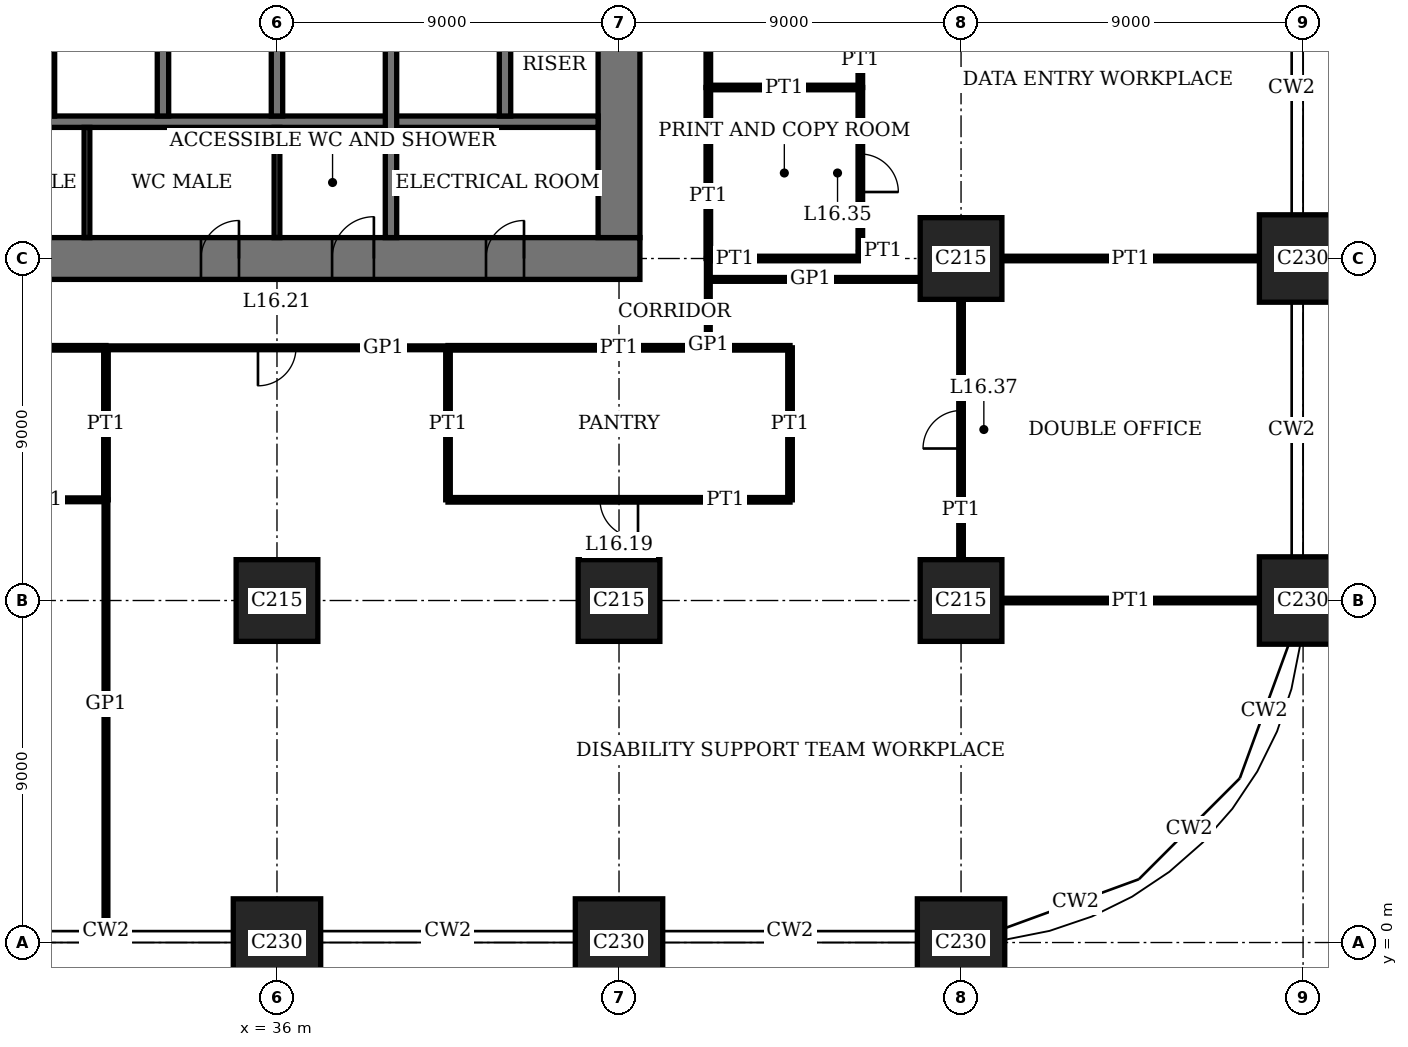
"""IFC4 building model, lengths in metres.
Left out: names, types, materials, properties, quantities, classifications, styles, units other than length and angle.
Written with IfcOpenShell. Run it as: python <this file> out.ifc"""

import sys

from ifc_helpers import new_model, si_unit, direction, frame, frame_2d, origin, origin_2d, place, context, subcontext, project, spatial, rectangle, extrude, element, fill, save


model = new_model("IFC4")
c1 = context("Model", 3, precision=1e-05, world=origin(), true_north=direction((0.0, 1.0)))
c2 = subcontext(c1, "Body", "Model", "MODEL_VIEW")
j1 = project(units=[si_unit("LENGTHUNIT", "METRE"), si_unit("PLANEANGLEUNIT", "RADIAN")], contexts=[c1])
p1 = place(None, origin())
s1 = spatial("IfcSite", under=j1, at=p1, CompositionType="ELEMENT")
p2 = place(p1, origin())
s2 = spatial("IfcBuilding", under=s1, at=p2, CompositionType="ELEMENT")
p3 = place(p2, frame((0.0, 0.0, 67.8)))
s3 = spatial("IfcBuildingStorey", under=s2, at=p3, CompositionType="ELEMENT", Elevation=67.8)
p4 = place(p3, frame((36.0, 0.0, 0.0), z_axis=(0.0, 0.0, 1.0), x_axis=(1.0, 0.0, 0.0)))
e1 = element("IfcColumn", 1, at=p4, inside=s3, PredefinedType="COLUMN", context=c2, shape_type="SweptSolid", body=[
    extrude(rectangle(XDim=2.3, YDim=2.3, at=origin_2d()), origin(), (0.0, 0.0, 1.0), 4.0),
])
p5 = place(p3, frame((36.0, 9.0, 0.0), z_axis=(0.0, 0.0, 1.0), x_axis=(1.0, 0.0, 0.0)))
e2 = element("IfcColumn", 2, at=p5, inside=s3, PredefinedType="COLUMN", context=c2, shape_type="SweptSolid", body=[
    extrude(rectangle(XDim=2.15, YDim=2.15, at=origin_2d()), origin(), (0.0, 0.0, 1.0), 4.0),
])
p6 = place(p3, frame((45.0, 0.0, 0.0), z_axis=(0.0, 0.0, 1.0), x_axis=(1.0, 0.0, 0.0)))
e3 = element("IfcColumn", 3, at=p6, inside=s3, PredefinedType="COLUMN", context=c2, shape_type="SweptSolid", body=[
    extrude(rectangle(XDim=2.3, YDim=2.3, at=origin_2d()), origin(), (0.0, 0.0, 1.0), 4.0),
])
p7 = place(p3, frame((45.0, 9.0, 0.0), z_axis=(0.0, 0.0, 1.0), x_axis=(1.0, 0.0, 0.0)))
e4 = element("IfcColumn", 4, at=p7, inside=s3, PredefinedType="COLUMN", context=c2, shape_type="SweptSolid", body=[
    extrude(rectangle(XDim=2.15, YDim=2.15, at=origin_2d()), origin(), (0.0, 0.0, 1.0), 4.0),
])
p8 = place(p3, frame((54.0, 0.0, 0.0), z_axis=(0.0, 0.0, 1.0), x_axis=(1.0, 0.0, 0.0)))
e5 = element("IfcColumn", 5, at=p8, inside=s3, PredefinedType="COLUMN", context=c2, shape_type="SweptSolid", body=[
    extrude(rectangle(XDim=2.3, YDim=2.3, at=origin_2d()), origin(), (0.0, 0.0, 1.0), 4.0),
])
for number, where, z_axis, x_axis in (
    (6, (54.0, 9.0, 0.0), (0.0, 0.0, 1.0), (1.0, 0.0, 0.0)),
    (7, (54.0, 18.0, 0.0), (0.0, 0.0, 1.0), (1.0, 0.0, 0.0)),
):
    element("IfcColumn", number, at=place(p3, frame(where, z_axis=z_axis, x_axis=x_axis)), inside=s3, PredefinedType="COLUMN", context=c2, shape_type="SweptSolid", body=[
        extrude(rectangle(XDim=2.15, YDim=2.15, at=origin_2d()), origin(), (0.0, 0.0, 1.0), 4.0),
    ])
for number, where, z_axis, x_axis in (
    (8, (63.0, 9.0, 0.0), (0.0, 0.0, 1.0), (1.0, 0.0, 0.0)),
    (9, (63.0, 18.0, 0.0), (0.0, 0.0, 1.0), (1.0, 0.0, 0.0)),
):
    element("IfcColumn", number, at=place(p3, frame(where, z_axis=z_axis, x_axis=x_axis)), inside=s3, PredefinedType="COLUMN", context=c2, shape_type="SweptSolid", body=[
        extrude(rectangle(XDim=2.3, YDim=2.3, at=origin_2d()), origin(), (0.0, 0.0, 1.0), 4.0),
    ])
p9 = place(p3, frame((17.45, 18.0, 0.0), z_axis=(0.0, 0.0, 1.0), x_axis=(1.0, 0.0, 0.0)))
e10 = element("IfcWall", 10, at=p9, inside=s3, PredefinedType="SHEAR", context=c2, shape_type="SweptSolid", body=[
    extrude(rectangle(XDim=28.1, YDim=1.1, at=frame_2d((14.05, 0.0))), origin(), (0.0, 0.0, 1.0), 4.0),
])
p10 = place(p9, frame((11.55, 0.0, 0.0)))
e11 = element("IfcOpeningElement", 11, at=p10, cuts=e10, PredefinedType="OPENING", context=c2, shape_type="SweptSolid", body=[
    extrude(rectangle(XDim=1.0, YDim=2.4, at=frame_2d((0.5, 1.2))), frame((0.0, 0.56, 0.0), z_axis=(0.0, -1.0, 0.0), x_axis=(1.0, 0.0, 0.0)), (0.0, 0.0, 1.0), 1.12),
])
p11 = place(p9, frame((16.55, 0.0, 0.0)))
e12 = element("IfcOpeningElement", 12, at=p11, cuts=e10, PredefinedType="OPENING", context=c2, shape_type="SweptSolid", body=[
    extrude(rectangle(XDim=1.0, YDim=2.4, at=frame_2d((0.5, 1.2))), frame((0.0, 0.56, 0.0), z_axis=(0.0, -1.0, 0.0), x_axis=(1.0, 0.0, 0.0)), (0.0, 0.0, 1.0), 1.12),
])
p12 = place(p9, frame((20.0, 0.0, 0.0)))
e13 = element("IfcOpeningElement", 13, at=p12, cuts=e10, PredefinedType="OPENING", context=c2, shape_type="SweptSolid", body=[
    extrude(rectangle(XDim=1.1, YDim=2.4, at=frame_2d((0.55, 1.2))), frame((0.0, 0.56, 0.0), z_axis=(0.0, -1.0, 0.0), x_axis=(1.0, 0.0, 0.0)), (0.0, 0.0, 1.0), 1.12),
])
p13 = place(p9, frame((24.05, 0.0, 0.0)))
e14 = element("IfcOpeningElement", 14, at=p13, cuts=e10, PredefinedType="OPENING", context=c2, shape_type="SweptSolid", body=[
    extrude(rectangle(XDim=1.0, YDim=2.4, at=frame_2d((0.5, 1.2))), frame((0.0, 0.56, 0.0), z_axis=(0.0, -1.0, 0.0), x_axis=(1.0, 0.0, 0.0)), (0.0, 0.0, 1.0), 1.12),
])
p14 = place(p3, frame((45.0, 18.55, 0.0), z_axis=(0.0, 0.0, 1.0), x_axis=(0.0, 1.0, 0.0)))
e15 = element("IfcWall", 15, at=p14, inside=s3, PredefinedType="SHEAR", context=c2, shape_type="SweptSolid", body=[
    extrude(rectangle(XDim=16.9, YDim=1.1, at=frame_2d((8.45, 0.0))), origin(), (0.0, 0.0, 1.0), 4.0),
])
p15 = place(p14, frame((8.45, 0.0, 0.0)))
e16 = element("IfcOpeningElement", 16, at=p15, cuts=e15, PredefinedType="OPENING", context=c2, shape_type="SweptSolid", body=[
    extrude(rectangle(XDim=1.8, YDim=2.4, at=frame_2d((0.9, 1.2))), frame((0.0, 0.56, 0.0), z_axis=(0.0, -1.0, 0.0), x_axis=(1.0, 0.0, 0.0)), (0.0, 0.0, 1.0), 1.12),
])
p16 = place(p3, frame((27.15, 21.6, 0.0), z_axis=(0.0, 0.0, 1.0), x_axis=(1.0, 0.0, 0.0)))
e17 = element("IfcWall", 17, at=p16, inside=s3, PredefinedType="SHEAR", context=c2, shape_type="SweptSolid", body=[
    extrude(rectangle(XDim=17.3, YDim=0.3, at=frame_2d((8.65, 0.0))), origin(), (0.0, 0.0, 1.0), 4.0),
])
for number, where, z_axis, x_axis in (
    (18, (30.0, 21.75, 0.0), (0.0, 0.0, 1.0), (0.0, 1.0, 0.0)),
    (19, (33.0, 21.75, 0.0), (0.0, 0.0, 1.0), (0.0, 1.0, 0.0)),
    (20, (36.0, 21.75, 0.0), (0.0, 0.0, 1.0), (0.0, 1.0, 0.0)),
):
    element("IfcWall", number, at=place(p3, frame(where, z_axis=z_axis, x_axis=x_axis)), inside=s3, PredefinedType="SHEAR", context=c2, shape_type="SweptSolid", body=[
        extrude(rectangle(XDim=2.7, YDim=0.3, at=frame_2d((1.35, 0.0))), origin(), (0.0, 0.0, 1.0), 4.0),
    ])
p17 = place(p3, frame((39.0, 18.55, 0.0), z_axis=(0.0, 0.0, 1.0), x_axis=(0.0, 1.0, 0.0)))
e21 = element("IfcWall", 21, at=p17, inside=s3, PredefinedType="SHEAR", context=c2, shape_type="SweptSolid", body=[
    extrude(rectangle(XDim=5.9, YDim=0.3, at=frame_2d((2.95, 0.0))), origin(), (0.0, 0.0, 1.0), 4.0),
])
p18 = place(p3, frame((42.0, 21.75, 0.0), z_axis=(0.0, 0.0, 1.0), x_axis=(0.0, 1.0, 0.0)))
e22 = element("IfcWall", 22, at=p18, inside=s3, PredefinedType="SHEAR", context=c2, shape_type="SweptSolid", body=[
    extrude(rectangle(XDim=2.7, YDim=0.3, at=frame_2d((1.35, 0.0))), origin(), (0.0, 0.0, 1.0), 4.0),
])
p19 = place(p3, frame((55.075, 9.0, 0.0), z_axis=(0.0, 0.0, 1.0), x_axis=(1.0, 0.0, 0.0)))
e23 = element("IfcWall", 23, at=p19, inside=s3, PredefinedType="PARTITIONING", context=c2, shape_type="SweptSolid", body=[
    extrude(rectangle(XDim=6.775, YDim=0.12, at=frame_2d((3.388, 0.0))), origin(), (0.0, 0.0, 1.0), 3.05),
])
p20 = place(p3, frame((40.5, 11.65, 0.0), z_axis=(0.0, 0.0, 1.0), x_axis=(1.0, 0.0, 0.0)))
e24 = element("IfcWall", 24, at=p20, inside=s3, PredefinedType="PARTITIONING", context=c2, shape_type="SweptSolid", body=[
    extrude(rectangle(XDim=9.0, YDim=0.12, at=frame_2d((4.5, 0.0))), origin(), (0.0, 0.0, 1.0), 3.75),
])
p21 = place(p20, frame((4.0, 0.0, 0.0)))
e25 = element("IfcOpeningElement", 25, at=p21, cuts=e24, PredefinedType="OPENING", context=c2, shape_type="SweptSolid", body=[
    extrude(rectangle(XDim=1.0, YDim=2.4, at=frame_2d((0.5, 1.2))), frame((0.0, 0.07, 0.0), z_axis=(0.0, -1.0, 0.0), x_axis=(1.0, 0.0, 0.0)), (0.0, 0.0, 1.0), 0.14),
])
p22 = place(p3, frame((22.5, 11.65, 0.0), z_axis=(0.0, 0.0, 1.0), x_axis=(1.0, 0.0, 0.0)))
e26 = element("IfcWall", 26, at=p22, inside=s3, PredefinedType="PARTITIONING", context=c2, shape_type="SweptSolid", body=[
    extrude(rectangle(XDim=9.0, YDim=0.1, at=frame_2d((4.5, 0.0))), origin(), (0.0, 0.0, 1.0), 3.75),
])
p23 = place(p22, frame((4.0, 0.0, 0.0)))
e27 = element("IfcOpeningElement", 27, at=p23, cuts=e26, PredefinedType="OPENING", context=c2, shape_type="SweptSolid", body=[
    extrude(rectangle(XDim=1.0, YDim=2.4, at=frame_2d((0.5, 1.2))), frame((0.0, 0.06, 0.0), z_axis=(0.0, -1.0, 0.0), x_axis=(1.0, 0.0, 0.0)), (0.0, 0.0, 1.0), 0.12),
])
for number, where, z_axis, x_axis in (
    (28, (22.5, 15.65, 0.0), (0.0, 0.0, 1.0), (1.0, 0.0, 0.0)),
    (29, (40.5, 15.65, 0.0), (0.0, 0.0, 1.0), (1.0, 0.0, 0.0)),
):
    element("IfcWall", number, at=place(p3, frame(where, z_axis=z_axis, x_axis=x_axis)), inside=s3, PredefinedType="PARTITIONING", context=c2, shape_type="SweptSolid", body=[
        extrude(rectangle(XDim=9.0, YDim=0.12, at=frame_2d((4.5, 0.0))), origin(), (0.0, 0.0, 1.0), 3.75),
    ])
p24 = place(p3, frame((31.5, 15.65, 0.0), z_axis=(0.0, 0.0, 1.0), x_axis=(1.0, 0.0, 0.0)))
e30 = element("IfcWall", 30, at=p24, inside=s3, PredefinedType="PARTITIONING", context=c2, shape_type="SweptSolid", body=[
    extrude(rectangle(XDim=9.0, YDim=0.1, at=frame_2d((4.5, 0.0))), origin(), (0.0, 0.0, 1.0), 3.75),
])
p25 = place(p24, frame((4.0, 0.0, 0.0)))
e31 = element("IfcOpeningElement", 31, at=p25, cuts=e30, PredefinedType="OPENING", context=c2, shape_type="SweptSolid", body=[
    extrude(rectangle(XDim=1.0, YDim=2.4, at=frame_2d((0.5, 1.2))), frame((0.0, 0.06, 0.0), z_axis=(0.0, -1.0, 0.0), x_axis=(1.0, 0.0, 0.0)), (0.0, 0.0, 1.0), 0.12),
])
p26 = place(p3, frame((47.35, 17.45, 0.0), z_axis=(0.0, 0.0, 1.0), x_axis=(1.0, 0.0, 0.0)))
e32 = element("IfcWall", 32, at=p26, inside=s3, PredefinedType="PARTITIONING", context=c2, shape_type="SweptSolid", body=[
    extrude(rectangle(XDim=5.575, YDim=0.1, at=frame_2d((2.788, 0.0))), origin(), (0.0, 0.0, 1.0), 3.05),
])
p27 = place(p3, frame((47.35, 18.0, 0.0), z_axis=(0.0, 0.0, 1.0), x_axis=(1.0, 0.0, 0.0)))
e33 = element("IfcWall", 33, at=p27, inside=s3, PredefinedType="PARTITIONING", context=c2, shape_type="SweptSolid", body=[
    extrude(rectangle(XDim=4.0, YDim=0.12, at=frame_2d((2.0, 0.0))), origin(), (0.0, 0.0, 1.0), 3.05),
])
p28 = place(p3, frame((55.075, 18.0, 0.0), z_axis=(0.0, 0.0, 1.0), x_axis=(1.0, 0.0, 0.0)))
e34 = element("IfcWall", 34, at=p28, inside=s3, PredefinedType="PARTITIONING", context=c2, shape_type="SweptSolid", body=[
    extrude(rectangle(XDim=6.775, YDim=0.12, at=frame_2d((3.388, 0.0))), origin(), (0.0, 0.0, 1.0), 3.05),
])
p29 = place(p3, frame((47.35, 22.5, 0.0), z_axis=(0.0, 0.0, 1.0), x_axis=(1.0, 0.0, 0.0)))
e35 = element("IfcWall", 35, at=p29, inside=s3, PredefinedType="PARTITIONING", context=c2, shape_type="SweptSolid", body=[
    extrude(rectangle(XDim=4.0, YDim=0.12, at=frame_2d((2.0, 0.0))), origin(), (0.0, 0.0, 1.0), 3.1),
])
p30 = place(p3, frame((31.5, 11.65, 0.0), z_axis=(0.0, 0.0, 1.0), x_axis=(0.0, 1.0, 0.0)))
e36 = element("IfcWall", 36, at=p30, inside=s3, PredefinedType="PARTITIONING", context=c2, shape_type="SweptSolid", body=[
    extrude(rectangle(XDim=4.0, YDim=0.12, at=frame_2d((2.0, 0.0))), origin(), (0.0, 0.0, 1.0), 3.75),
])
p31 = place(p3, frame((31.5, 0.31, 0.0), z_axis=(0.0, 0.0, 1.0), x_axis=(0.0, 1.0, 0.0)))
e37 = element("IfcWall", 37, at=p31, inside=s3, PredefinedType="PARTITIONING", context=c2, shape_type="SweptSolid", body=[
    extrude(rectangle(XDim=11.34, YDim=0.1, at=frame_2d((5.67, 0.0))), origin(), (0.0, 0.0, 1.0), 3.75),
])
p32 = place(p3, frame((40.5, 11.65, 0.0), z_axis=(0.0, 0.0, 1.0), x_axis=(0.0, 1.0, 0.0)))
e38 = element("IfcWall", 38, at=p32, inside=s3, PredefinedType="PARTITIONING", context=c2, shape_type="SweptSolid", body=[
    extrude(rectangle(XDim=4.0, YDim=0.12, at=frame_2d((2.0, 0.0))), origin(), (0.0, 0.0, 1.0), 3.75),
])
for number, where, z_axis, x_axis in (
    (39, (47.35, 18.0, 0.0), (0.0, 0.0, 1.0), (0.0, 1.0, 0.0)),
    (40, (47.35, 22.5, 0.0), (0.0, 0.0, 1.0), (0.0, 1.0, 0.0)),
):
    element("IfcWall", number, at=place(p3, frame(where, z_axis=z_axis, x_axis=x_axis)), inside=s3, PredefinedType="PARTITIONING", context=c2, shape_type="SweptSolid", body=[
        extrude(rectangle(XDim=4.5, YDim=0.12, at=frame_2d((2.25, 0.0))), origin(), (0.0, 0.0, 1.0), 3.75),
    ])
p33 = place(p3, frame((47.35, 15.65, 0.0), z_axis=(0.0, 0.0, 1.0), x_axis=(0.0, 1.0, 0.0)))
e41 = element("IfcWall", 41, at=p33, inside=s3, PredefinedType="PARTITIONING", context=c2, shape_type="SweptSolid", body=[
    extrude(rectangle(XDim=2.35, YDim=0.1, at=frame_2d((1.175, 0.0))), origin(), (0.0, 0.0, 1.0), 3.75),
])
p34 = place(p3, frame((49.5, 11.65, 0.0), z_axis=(0.0, 0.0, 1.0), x_axis=(0.0, 1.0, 0.0)))
e42 = element("IfcWall", 42, at=p34, inside=s3, PredefinedType="PARTITIONING", context=c2, shape_type="SweptSolid", body=[
    extrude(rectangle(XDim=4.0, YDim=0.12, at=frame_2d((2.0, 0.0))), origin(), (0.0, 0.0, 1.0), 3.75),
])
p35 = place(p3, frame((51.35, 18.0, 0.0), z_axis=(0.0, 0.0, 1.0), x_axis=(0.0, 1.0, 0.0)))
e43 = element("IfcWall", 43, at=p35, inside=s3, PredefinedType="PARTITIONING", context=c2, shape_type="SweptSolid", body=[
    extrude(rectangle(XDim=4.5, YDim=0.12, at=frame_2d((2.25, 0.0))), origin(), (0.0, 0.0, 1.0), 3.75),
])
p36 = place(p35, frame((1.75, 0.0, 0.0)))
e44 = element("IfcOpeningElement", 44, at=p36, cuts=e43, PredefinedType="OPENING", context=c2, shape_type="SweptSolid", body=[
    extrude(rectangle(XDim=1.0, YDim=2.4, at=frame_2d((0.5, 1.2))), frame((0.0, 0.07, 0.0), z_axis=(0.0, -1.0, 0.0), x_axis=(1.0, 0.0, 0.0)), (0.0, 0.0, 1.0), 0.14),
])
p37 = place(p3, frame((51.35, 22.5, 0.0), z_axis=(0.0, 0.0, 1.0), x_axis=(0.0, 1.0, 0.0)))
e45 = element("IfcWall", 45, at=p37, inside=s3, PredefinedType="PARTITIONING", context=c2, shape_type="SweptSolid", body=[
    extrude(rectangle(XDim=4.5, YDim=0.12, at=frame_2d((2.25, 0.0))), origin(), (0.0, 0.0, 1.0), 3.75),
])
p38 = place(p37, frame((1.75, 0.0, 0.0)))
e46 = element("IfcOpeningElement", 46, at=p38, cuts=e45, PredefinedType="OPENING", context=c2, shape_type="SweptSolid", body=[
    extrude(rectangle(XDim=1.0, YDim=2.4, at=frame_2d((0.5, 1.2))), frame((0.0, 0.07, 0.0), z_axis=(0.0, -1.0, 0.0), x_axis=(1.0, 0.0, 0.0)), (0.0, 0.0, 1.0), 0.14),
])
p39 = place(p3, frame((54.0, 10.075, 0.0), z_axis=(0.0, 0.0, 1.0), x_axis=(0.0, 1.0, 0.0)))
e47 = element("IfcWall", 47, at=p39, inside=s3, PredefinedType="PARTITIONING", context=c2, shape_type="SweptSolid", body=[
    extrude(rectangle(XDim=6.85, YDim=0.12, at=frame_2d((3.425, 0.0))), origin(), (0.0, 0.0, 1.0), 3.05),
])
p40 = place(p39, frame((2.925, 0.0, 0.0)))
e48 = element("IfcOpeningElement", 48, at=p40, cuts=e47, PredefinedType="OPENING", context=c2, shape_type="SweptSolid", body=[
    extrude(rectangle(XDim=1.0, YDim=2.4, at=frame_2d((0.5, 1.2))), frame((0.0, 0.07, 0.0), z_axis=(0.0, -1.0, 0.0), x_axis=(1.0, 0.0, 0.0)), (0.0, 0.0, 1.0), 0.14),
])
for number, where, z_axis, x_axis in (
    (49, (31.0, 18.55, 0.0), (0.0, 0.0, 1.0), (0.0, 1.0, 0.0)),
    (50, (36.0, 18.55, 0.0), (0.0, 0.0, 1.0), (0.0, 1.0, 0.0)),
):
    element("IfcWall", number, at=place(p3, frame(where, z_axis=z_axis, x_axis=x_axis)), inside=s3, PredefinedType="PARTITIONING", context=c2, shape_type="SweptSolid", body=[
        extrude(rectangle(XDim=2.9, YDim=0.15, at=frame_2d((1.45, 0.0))), origin(), (0.0, 0.0, 1.0), 3.75),
    ])
p41 = place(p11, origin())
e51 = element("IfcDoor", 51, at=p41, inside=s3, OperationType="SINGLE_SWING_LEFT", PredefinedType="DOOR", context=c2, shape_type="SweptSolid", body=[
    extrude(rectangle(XDim=1.0, YDim=2.4, at=frame_2d((0.5, 1.2))), frame((0.0, 0.025, 0.0), z_axis=(0.0, -1.0, 0.0), x_axis=(1.0, 0.0, 0.0)), (0.0, 0.0, 1.0), 0.05),
    extrude(rectangle(XDim=0.04, YDim=2.4, at=frame_2d((0.02, 1.2))), frame((0.0, 0.4, 0.0), z_axis=(0.0, -1.0, 0.0), x_axis=(1.0, 0.0, 0.0)), (0.0, 0.0, 1.0), 0.8),
    extrude(rectangle(XDim=0.04, YDim=2.4, at=frame_2d((0.98, 1.2))), frame((0.0, 0.4, 0.0), z_axis=(0.0, -1.0, 0.0), x_axis=(1.0, 0.0, 0.0)), (0.0, 0.0, 1.0), 0.8),
    extrude(rectangle(XDim=1.0, YDim=0.04, at=frame_2d((0.5, 2.38))), frame((0.0, 0.4, 0.0), z_axis=(0.0, -1.0, 0.0), x_axis=(1.0, 0.0, 0.0)), (0.0, 0.0, 1.0), 0.8),
])
fill(e12, e51)
p42 = place(p12, origin())
e52 = element("IfcDoor", 52, at=p42, inside=s3, OperationType="SINGLE_SWING_LEFT", PredefinedType="DOOR", context=c2, shape_type="SweptSolid", body=[
    extrude(rectangle(XDim=1.1, YDim=2.4, at=frame_2d((0.55, 1.2))), frame((0.0, 0.025, 0.0), z_axis=(0.0, -1.0, 0.0), x_axis=(1.0, 0.0, 0.0)), (0.0, 0.0, 1.0), 0.05),
    extrude(rectangle(XDim=0.04, YDim=2.4, at=frame_2d((0.02, 1.2))), frame((0.0, 0.44, 0.0), z_axis=(0.0, -1.0, 0.0), x_axis=(1.0, 0.0, 0.0)), (0.0, 0.0, 1.0), 0.88),
    extrude(rectangle(XDim=0.04, YDim=2.4, at=frame_2d((1.08, 1.2))), frame((0.0, 0.44, 0.0), z_axis=(0.0, -1.0, 0.0), x_axis=(1.0, 0.0, 0.0)), (0.0, 0.0, 1.0), 0.88),
    extrude(rectangle(XDim=1.1, YDim=0.04, at=frame_2d((0.55, 2.38))), frame((0.0, 0.44, 0.0), z_axis=(0.0, -1.0, 0.0), x_axis=(1.0, 0.0, 0.0)), (0.0, 0.0, 1.0), 0.88),
])
fill(e13, e52)
p43 = place(p13, origin())
e53 = element("IfcDoor", 53, at=p43, inside=s3, OperationType="SINGLE_SWING_LEFT", PredefinedType="DOOR", context=c2, shape_type="SweptSolid", body=[
    extrude(rectangle(XDim=1.0, YDim=2.4, at=frame_2d((0.5, 1.2))), frame((0.0, 0.025, 0.0), z_axis=(0.0, -1.0, 0.0), x_axis=(1.0, 0.0, 0.0)), (0.0, 0.0, 1.0), 0.05),
    extrude(rectangle(XDim=0.04, YDim=2.4, at=frame_2d((0.02, 1.2))), frame((0.0, 0.4, 0.0), z_axis=(0.0, -1.0, 0.0), x_axis=(1.0, 0.0, 0.0)), (0.0, 0.0, 1.0), 0.8),
    extrude(rectangle(XDim=0.04, YDim=2.4, at=frame_2d((0.98, 1.2))), frame((0.0, 0.4, 0.0), z_axis=(0.0, -1.0, 0.0), x_axis=(1.0, 0.0, 0.0)), (0.0, 0.0, 1.0), 0.8),
    extrude(rectangle(XDim=1.0, YDim=0.04, at=frame_2d((0.5, 2.38))), frame((0.0, 0.4, 0.0), z_axis=(0.0, -1.0, 0.0), x_axis=(1.0, 0.0, 0.0)), (0.0, 0.0, 1.0), 0.8),
])
fill(e14, e53)
p44 = place(p21, origin())
e54 = element("IfcDoor", 54, at=p44, inside=s3, OperationType="SINGLE_SWING_RIGHT", PredefinedType="DOOR", context=c2, shape_type="SweptSolid", body=[
    extrude(rectangle(XDim=1.0, YDim=2.4, at=frame_2d((0.5, 1.2))), frame((0.0, 0.025, 0.0), z_axis=(0.0, -1.0, 0.0), x_axis=(1.0, 0.0, 0.0)), (0.0, 0.0, 1.0), 0.05),
])
fill(e25, e54)
p45 = place(p25, origin())
e55 = element("IfcDoor", 55, at=p45, inside=s3, OperationType="SINGLE_SWING_LEFT", PredefinedType="DOOR", context=c2, shape_type="SweptSolid", body=[
    extrude(rectangle(XDim=1.0, YDim=2.4, at=frame_2d((0.5, 1.2))), frame((0.0, 0.02, 0.0), z_axis=(0.0, -1.0, 0.0), x_axis=(1.0, 0.0, 0.0)), (0.0, 0.0, 1.0), 0.04),
])
fill(e31, e55)
p46 = place(p36, origin())
e56 = element("IfcDoor", 56, at=p46, inside=s3, OperationType="SINGLE_SWING_LEFT", PredefinedType="DOOR", context=c2, shape_type="SweptSolid", body=[
    extrude(rectangle(XDim=1.0, YDim=2.4, at=frame_2d((0.5, 1.2))), frame((0.0, 0.025, 0.0), z_axis=(0.0, -1.0, 0.0), x_axis=(1.0, 0.0, 0.0)), (0.0, 0.0, 1.0), 0.05),
])
fill(e44, e56)
p47 = place(p40, origin())
e57 = element("IfcDoor", 57, at=p47, inside=s3, OperationType="SINGLE_SWING_RIGHT", PredefinedType="DOOR", context=c2, shape_type="SweptSolid", body=[
    extrude(rectangle(XDim=1.0, YDim=2.4, at=frame_2d((0.5, 1.2))), frame((0.0, 0.025, 0.0), z_axis=(0.0, -1.0, 0.0), x_axis=(1.0, 0.0, 0.0)), (0.0, 0.0, 1.0), 0.05),
])
fill(e48, e57)
save(model, sys.argv[1])
